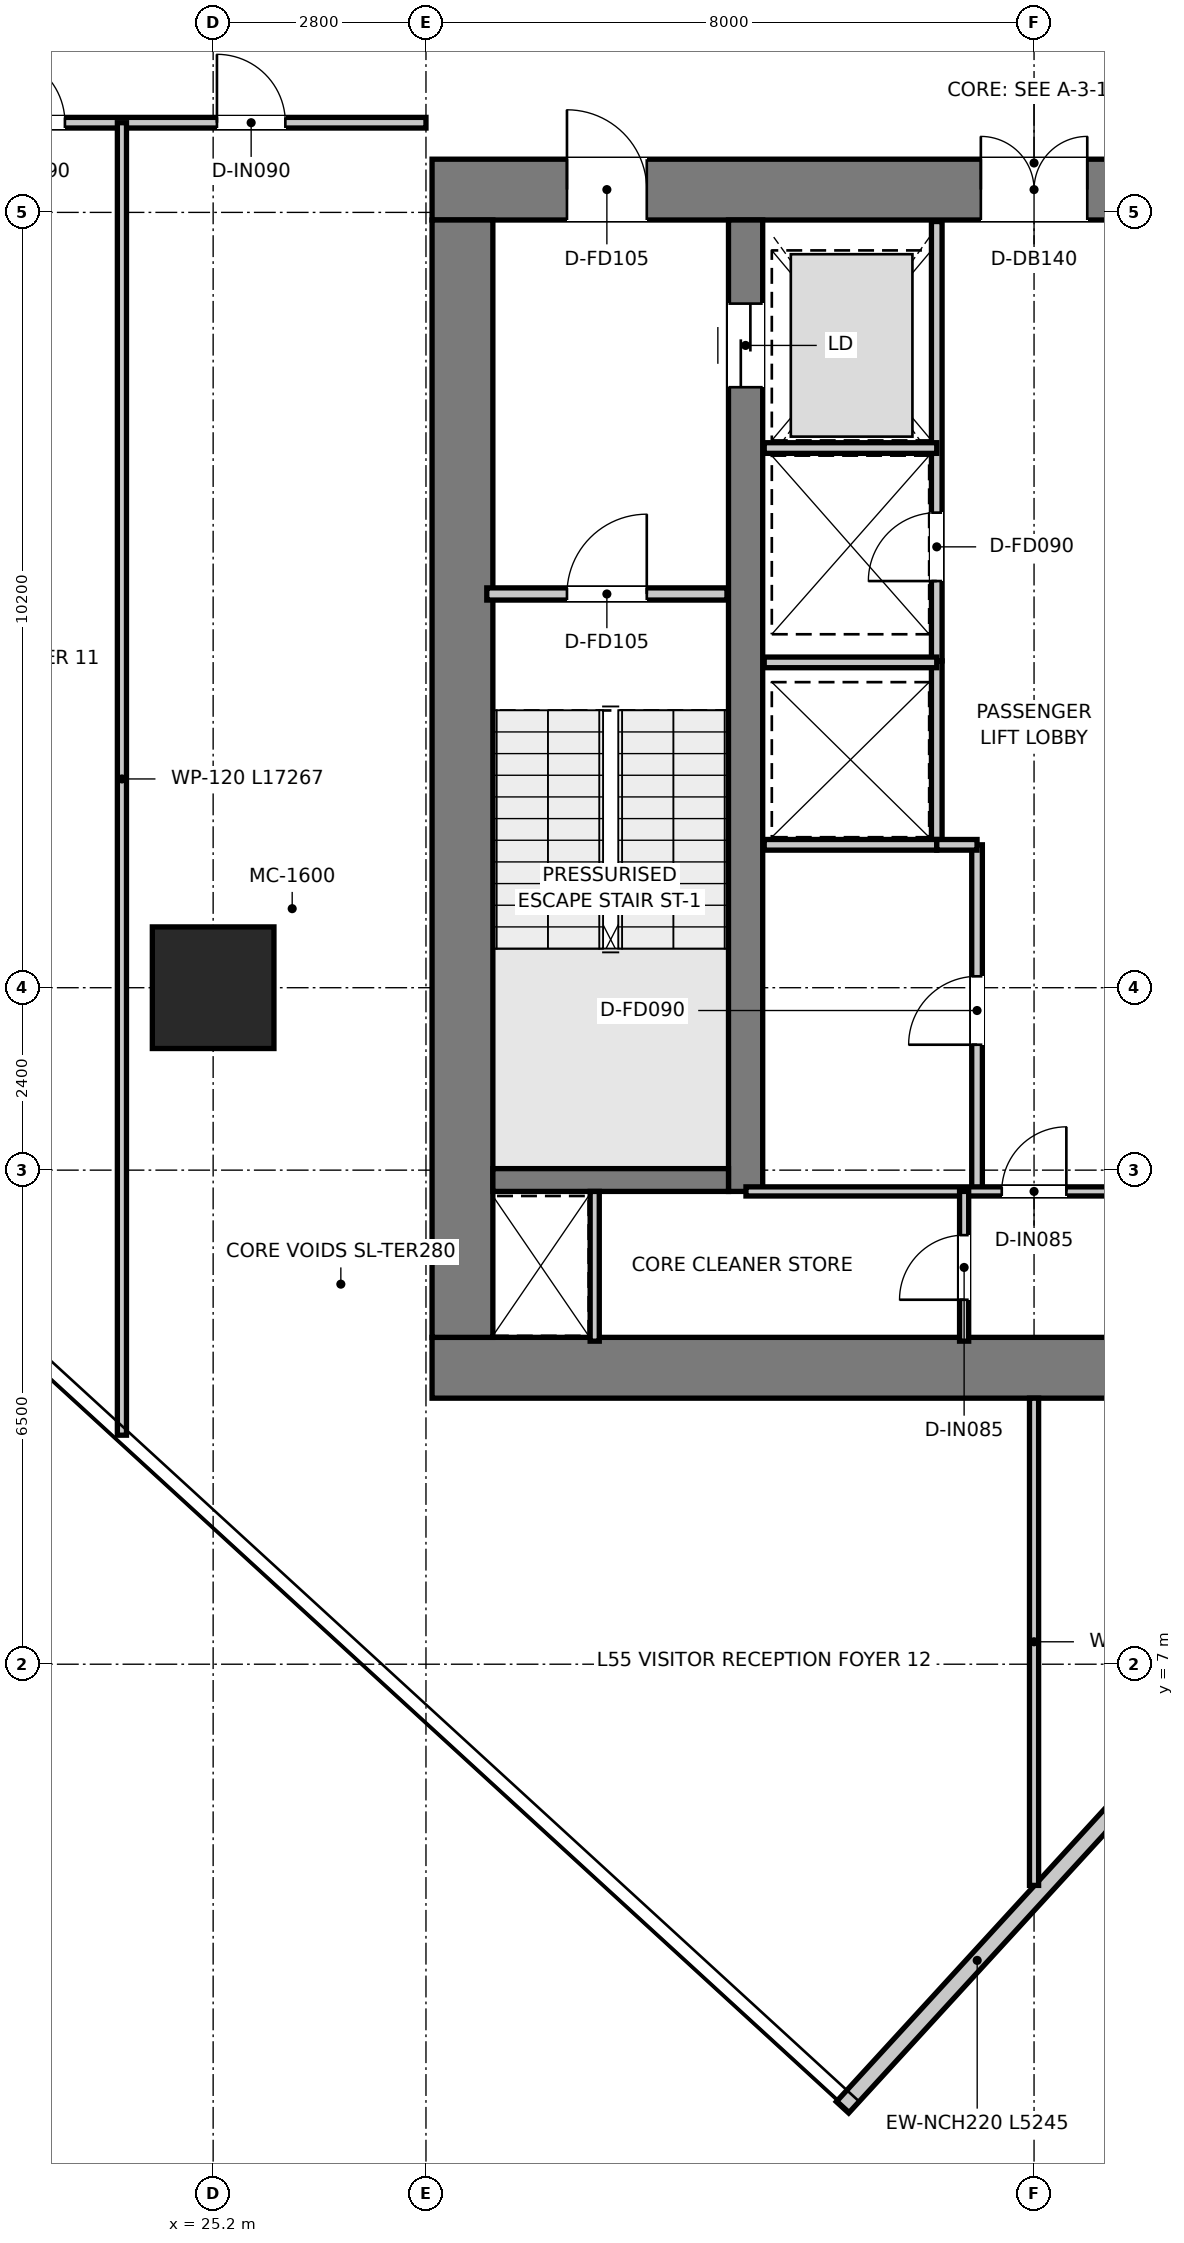
"""IFC4 building model, lengths in metres.
Left out: names, types, materials, properties, quantities, classifications, styles, units other than length and angle.
Written with IfcOpenShell. Run it as: python <this file> out.ifc"""

import sys

from ifc_helpers import new_model, si_unit, direction, frame, frame_2d, origin, origin_2d, place, context, subcontext, project, spatial, rectangle, extrude, source, transform, mapped, element, fill, save


model = new_model("IFC4")
c1 = context("Model", 3, precision=1e-05, world=origin(), true_north=direction((0.0, 1.0)))
c2 = subcontext(c1, "Body", "Model", "MODEL_VIEW")
j1 = project(units=[si_unit("LENGTHUNIT", "METRE"), si_unit("PLANEANGLEUNIT", "RADIAN")], contexts=[c1])
p1 = place(None, origin())
s1 = spatial("IfcSite", under=j1, at=p1, CompositionType="ELEMENT")
p2 = place(p1, origin())
s2 = spatial("IfcBuilding", under=s1, at=p2, CompositionType="ELEMENT")
p3 = place(p2, frame((0.0, 0.0, 227.05)))
s3 = spatial("IfcBuildingStorey", under=s2, at=p3, CompositionType="ELEMENT", Elevation=227.05)
p4 = place(p3, frame((28.08, 10.9, 0.0), z_axis=(0.0, 0.0, 1.0), x_axis=(1.0, 0.0, 0.0)))
e1 = element("IfcWall", 1, at=p4, inside=s3, PredefinedType="SHEAR", context=c2, shape_type="SweptSolid", body=[
    extrude(rectangle(XDim=15.84, YDim=0.8, at=frame_2d((7.92, 0.0))), origin(), (0.0, 0.0, 1.0), 3.95),
])
p5 = place(p3, frame((28.08, 26.4, 0.0), z_axis=(0.0, 0.0, 1.0), x_axis=(1.0, 0.0, 0.0)))
e2 = element("IfcWall", 2, at=p5, inside=s3, PredefinedType="SHEAR", context=c2, shape_type="SweptSolid", body=[
    extrude(rectangle(XDim=15.84, YDim=0.8, at=frame_2d((7.92, 0.0))), origin(), (0.0, 0.0, 1.0), 3.95),
])
p6 = place(p5, frame((7.22, 0.0, 0.0)))
e3 = element("IfcOpeningElement", 3, at=p6, cuts=e2, PredefinedType="OPENING", context=c2, shape_type="SweptSolid", body=[
    extrude(rectangle(XDim=1.4, YDim=2.2, at=frame_2d((0.7, 1.1))), frame((0.0, 0.41, 0.0), z_axis=(0.0, -1.0, 0.0), x_axis=(1.0, 0.0, 0.0)), (0.0, 0.0, 1.0), 0.82),
])
p7 = place(p5, frame((1.775, 0.0, 0.0)))
e4 = element("IfcOpeningElement", 4, at=p7, cuts=e2, PredefinedType="OPENING", context=c2, shape_type="SweptSolid", body=[
    extrude(rectangle(XDim=1.05, YDim=2.1, at=frame_2d((0.525, 1.05))), frame((0.0, 0.41, 0.0), z_axis=(0.0, -1.0, 0.0), x_axis=(1.0, 0.0, 0.0)), (0.0, 0.0, 1.0), 0.82),
])
p8 = place(p5, frame((13.015, 0.0, 0.0)))
e5 = element("IfcOpeningElement", 5, at=p8, cuts=e2, PredefinedType="OPENING", context=c2, shape_type="SweptSolid", body=[
    extrude(rectangle(XDim=1.05, YDim=2.1, at=frame_2d((0.525, 1.05))), frame((0.0, 0.41, 0.0), z_axis=(0.0, -1.0, 0.0), x_axis=(1.0, 0.0, 0.0)), (0.0, 0.0, 1.0), 0.82),
])
p9 = place(p3, frame((28.48, 11.3, 0.0), z_axis=(0.0, 0.0, 1.0), x_axis=(0.0, 1.0, 0.0)))
e6 = element("IfcWall", 6, at=p9, inside=s3, PredefinedType="SHEAR", context=c2, shape_type="SweptSolid", body=[
    extrude(rectangle(XDim=14.7, YDim=0.8, at=frame_2d((7.35, 0.0))), origin(), (0.0, 0.0, 1.0), 3.95),
])
p10 = place(p3, frame((32.205, 13.22, 0.0), z_axis=(0.0, 0.0, 1.0), x_axis=(0.0, 1.0, 0.0)))
e7 = element("IfcWall", 7, at=p10, inside=s3, PredefinedType="SHEAR", context=c2, shape_type="SweptSolid", body=[
    extrude(rectangle(XDim=12.78, YDim=0.45, at=frame_2d((6.39, 0.0))), origin(), (0.0, 0.0, 1.0), 3.95),
])
p11 = place(p10, frame((10.58, 0.0, 0.0)))
e8 = element("IfcOpeningElement", 8, at=p11, cuts=e7, PredefinedType="OPENING", context=c2, shape_type="SweptSolid", body=[
    extrude(rectangle(XDim=1.1, YDim=2.15, at=frame_2d((0.55, 1.075))), frame((0.0, 0.235, 0.0), z_axis=(0.0, -1.0, 0.0), x_axis=(1.0, 0.0, 0.0)), (0.0, 0.0, 1.0), 0.47),
])
p12 = place(p3, frame((28.88, 13.37, 0.0), z_axis=(0.0, 0.0, 1.0), x_axis=(1.0, 0.0, 0.0)))
e9 = element("IfcWall", 9, at=p12, inside=s3, PredefinedType="SHEAR", context=c2, shape_type="SweptSolid", body=[
    extrude(rectangle(XDim=3.1, YDim=0.3, at=frame_2d((1.55, 0.0))), origin(), (0.0, 0.0, 1.0), 3.95),
])
m1 = source(origin(), c2, "Body", "SweptSolid", [
    extrude(rectangle(XDim=1.6, YDim=1.6, at=origin_2d()), origin(), (0.0, 0.0, 1.0), 3.95),
])
p13 = place(p3, frame((25.2, 15.9, 0.0), z_axis=(0.0, 0.0, 1.0), x_axis=(1.0, 0.0, 0.0)))
e10 = element("IfcColumn", 10, at=p13, inside=s3, PredefinedType="USERDEFINED", context=c2, shape_type="MappedRepresentation", body=[
    mapped(m1, transform((0.0, 0.0, 0.0), x_axis=(1.0, 0.0, 0.0), y_axis=(0.0, 1.0, 0.0), z_axis=(0.0, 0.0, 1.0), scale=1.0)),
])
p14 = place(p3, frame((33.48, 1.17, 0.0), z_axis=(0.0, 0.0, 1.0), x_axis=(0.675596040677, 0.737271991752, 0.0)))
e11 = element("IfcWall", 11, at=p14, inside=s3, PredefinedType="ELEMENTEDWALL", context=c2, shape_type="SweptSolid", body=[
    extrude(rectangle(XDim=5.245, YDim=0.22, at=frame_2d((2.623, 0.0))), origin(), (0.0, 0.0, 1.0), 3.67),
])
p15 = place(p3, frame((28.8, 21.08, 0.0), z_axis=(0.0, 0.0, 1.0), x_axis=(1.0, 0.0, 0.0)))
e12 = element("IfcWall", 12, at=p15, inside=s3, PredefinedType="PARTITIONING", context=c2, shape_type="SweptSolid", body=[
    extrude(rectangle(XDim=3.16, YDim=0.16, at=frame_2d((1.58, 0.0))), origin(), (0.0, 0.0, 1.0), 3.67),
])
p16 = place(p15, frame((1.055, 0.0, 0.0)))
e13 = element("IfcOpeningElement", 13, at=p16, cuts=e12, PredefinedType="OPENING", context=c2, shape_type="SweptSolid", body=[
    extrude(rectangle(XDim=1.05, YDim=2.1, at=frame_2d((0.525, 1.05))), frame((0.0, 0.09, 0.0), z_axis=(0.0, -1.0, 0.0), x_axis=(1.0, 0.0, 0.0)), (0.0, 0.0, 1.0), 0.18),
])
p17 = place(p3, frame((34.72, 20.2, 0.0), z_axis=(0.0, 0.0, 1.0), x_axis=(0.0, 1.0, 0.0)))
e14 = element("IfcWall", 14, at=p17, inside=s3, PredefinedType="PARTITIONING", context=c2, shape_type="SweptSolid", body=[
    extrude(rectangle(XDim=5.78, YDim=0.14, at=frame_2d((2.89, 0.0))), origin(), (0.0, 0.0, 1.0), 2.67),
])
p18 = place(p17, frame((1.05, 0.0, 0.0)))
e15 = element("IfcOpeningElement", 15, at=p18, cuts=e14, PredefinedType="OPENING", context=c2, shape_type="SweptSolid", body=[
    extrude(rectangle(XDim=0.9, YDim=2.1, at=frame_2d((0.45, 1.05))), frame((0.0, 0.08, 0.0), z_axis=(0.0, -1.0, 0.0), x_axis=(1.0, 0.0, 0.0)), (0.0, 0.0, 1.0), 0.16),
])
p19 = place(p3, frame((32.45, 23.0, 0.0), z_axis=(0.0, 0.0, 1.0), x_axis=(1.0, 0.0, 0.0)))
e16 = element("IfcWall", 16, at=p19, inside=s3, PredefinedType="PARTITIONING", context=c2, shape_type="SweptSolid", body=[
    extrude(rectangle(XDim=2.27, YDim=0.14, at=frame_2d((1.135, 0.0))), origin(), (0.0, 0.0, 1.0), 2.67),
])
p20 = place(p3, frame((34.72, 17.78, 0.0), z_axis=(0.0, 0.0, 1.0), x_axis=(0.0, 1.0, 0.0)))
e17 = element("IfcWall", 17, at=p20, inside=s3, PredefinedType="PARTITIONING", context=c2, shape_type="SweptSolid", body=[
    extrude(rectangle(XDim=2.42, YDim=0.14, at=frame_2d((1.21, 0.0))), origin(), (0.0, 0.0, 1.0), 3.67),
])
for number, where, z_axis, x_axis in (
    (18, (32.45, 17.78, 0.0), (0.0, 0.0, 1.0), (1.0, 0.0, 0.0)),
    (19, (32.45, 20.18, 0.0), (0.0, 0.0, 1.0), (1.0, 0.0, 0.0)),
):
    element("IfcWall", number, at=place(p3, frame(where, z_axis=z_axis, x_axis=x_axis)), inside=s3, PredefinedType="PARTITIONING", context=c2, shape_type="SweptSolid", body=[
        extrude(rectangle(XDim=2.27, YDim=0.14, at=frame_2d((1.135, 0.0))), origin(), (0.0, 0.0, 1.0), 3.67),
    ])
p21 = place(p3, frame((35.25, 13.22, 0.0), z_axis=(0.0, 0.0, 1.0), x_axis=(0.0, 1.0, 0.0)))
e20 = element("IfcWall", 20, at=p21, inside=s3, PredefinedType="PARTITIONING", context=c2, shape_type="SweptSolid", body=[
    extrude(rectangle(XDim=4.56, YDim=0.14, at=frame_2d((2.28, 0.0))), origin(), (0.0, 0.0, 1.0), 3.67),
])
p22 = place(p21, frame((1.93, 0.0, 0.0)))
e21 = element("IfcOpeningElement", 21, at=p22, cuts=e20, PredefinedType="OPENING", context=c2, shape_type="SweptSolid", body=[
    extrude(rectangle(XDim=0.9, YDim=2.1, at=frame_2d((0.45, 1.05))), frame((0.0, 0.08, 0.0), z_axis=(0.0, -1.0, 0.0), x_axis=(1.0, 0.0, 0.0)), (0.0, 0.0, 1.0), 0.16),
])
p23 = place(p3, frame((34.72, 17.78, 0.0), z_axis=(0.0, 0.0, 1.0), x_axis=(1.0, 0.0, 0.0)))
e22 = element("IfcWall", 22, at=p23, inside=s3, PredefinedType="PARTITIONING", context=c2, shape_type="SweptSolid", body=[
    extrude(rectangle(XDim=0.53, YDim=0.14, at=frame_2d((0.265, 0.0))), origin(), (0.0, 0.0, 1.0), 3.67),
])
p24 = place(p3, frame((30.22, 11.25, 0.0), z_axis=(0.0, 0.0, 1.0), x_axis=(0.0, 1.0, 0.0)))
e23 = element("IfcWall", 23, at=p24, inside=s3, PredefinedType="PARTITIONING", context=c2, shape_type="SweptSolid", body=[
    extrude(rectangle(XDim=1.97, YDim=0.12, at=frame_2d((0.985, 0.0))), origin(), (0.0, 0.0, 1.0), 3.67),
])
p25 = place(p3, frame((32.21, 13.22, 0.0), z_axis=(0.0, 0.0, 1.0), x_axis=(1.0, 0.0, 0.0)))
e24 = element("IfcWall", 24, at=p25, inside=s3, PredefinedType="PARTITIONING", context=c2, shape_type="SweptSolid", body=[
    extrude(rectangle(XDim=7.58, YDim=0.12, at=frame_2d((3.79, 0.0))), origin(), (0.0, 0.0, 1.0), 3.67),
])
p26 = place(p25, frame((3.365, 0.0, 0.0)))
e25 = element("IfcOpeningElement", 25, at=p26, cuts=e24, PredefinedType="OPENING", context=c2, shape_type="SweptSolid", body=[
    extrude(rectangle(XDim=0.85, YDim=2.1, at=frame_2d((0.425, 1.05))), frame((0.0, 0.07, 0.0), z_axis=(0.0, -1.0, 0.0), x_axis=(1.0, 0.0, 0.0)), (0.0, 0.0, 1.0), 0.14),
])
p27 = place(p3, frame((35.08, 11.25, 0.0), z_axis=(0.0, 0.0, 1.0), x_axis=(0.0, 1.0, 0.0)))
e26 = element("IfcWall", 26, at=p27, inside=s3, PredefinedType="PARTITIONING", context=c2, shape_type="SweptSolid", body=[
    extrude(rectangle(XDim=1.97, YDim=0.12, at=frame_2d((0.985, 0.0))), origin(), (0.0, 0.0, 1.0), 3.67),
])
p28 = place(p27, frame((0.545, 0.0, 0.0)))
e27 = element("IfcOpeningElement", 27, at=p28, cuts=e26, PredefinedType="OPENING", context=c2, shape_type="SweptSolid", body=[
    extrude(rectangle(XDim=0.85, YDim=2.1, at=frame_2d((0.425, 1.05))), frame((0.0, 0.07, 0.0), z_axis=(0.0, -1.0, 0.0), x_axis=(1.0, 0.0, 0.0)), (0.0, 0.0, 1.0), 0.14),
])
p29 = place(p3, frame((12.757, 27.28, 0.0), z_axis=(0.0, 0.0, 1.0), x_axis=(1.0, 0.0, 0.0)))
e28 = element("IfcWall", 28, at=p29, inside=s3, PredefinedType="PARTITIONING", context=c2, shape_type="SweptSolid", body=[
    extrude(rectangle(XDim=15.243, YDim=0.14, at=frame_2d((7.622, 0.0))), origin(), (0.0, 0.0, 1.0), 3.03),
])
p30 = place(p29, frame((2.056, 0.0, 0.0)))
e29 = element("IfcOpeningElement", 29, at=p30, cuts=e28, PredefinedType="OPENING", context=c2, shape_type="SweptSolid", body=[
    extrude(rectangle(XDim=0.9, YDim=2.1, at=frame_2d((0.45, 1.05))), frame((0.0, 0.08, 0.0), z_axis=(0.0, -1.0, 0.0), x_axis=(1.0, 0.0, 0.0)), (0.0, 0.0, 1.0), 0.16),
])
p31 = place(p29, frame((9.593, 0.0, 0.0)))
e30 = element("IfcOpeningElement", 30, at=p31, cuts=e28, PredefinedType="OPENING", context=c2, shape_type="SweptSolid", body=[
    extrude(rectangle(XDim=0.9, YDim=2.1, at=frame_2d((0.45, 1.05))), frame((0.0, 0.08, 0.0), z_axis=(0.0, -1.0, 0.0), x_axis=(1.0, 0.0, 0.0)), (0.0, 0.0, 1.0), 0.16),
])
p32 = place(p29, frame((12.493, 0.0, 0.0)))
e31 = element("IfcOpeningElement", 31, at=p32, cuts=e28, PredefinedType="OPENING", context=c2, shape_type="SweptSolid", body=[
    extrude(rectangle(XDim=0.9, YDim=2.1, at=frame_2d((0.45, 1.05))), frame((0.0, 0.08, 0.0), z_axis=(0.0, -1.0, 0.0), x_axis=(1.0, 0.0, 0.0)), (0.0, 0.0, 1.0), 0.16),
])
p33 = place(p3, frame((36.0, 4.09, 0.0), z_axis=(0.0, 0.0, 1.0), x_axis=(0.0, 1.0, 0.0)))
e32 = element("IfcWall", 32, at=p33, inside=s3, PredefinedType="PARTITIONING", context=c2, shape_type="SweptSolid", body=[
    extrude(rectangle(XDim=6.41, YDim=0.12, at=frame_2d((3.205, 0.0))), origin(), (0.0, 0.0, 1.0), 3.67),
])
p34 = place(p3, frame((24.0, 10.013, 0.0), z_axis=(0.0, 0.0, 1.0), x_axis=(0.0, 1.0, 0.0)))
e33 = element("IfcWall", 33, at=p34, inside=s3, PredefinedType="PARTITIONING", context=c2, shape_type="SweptSolid", body=[
    extrude(rectangle(XDim=17.267, YDim=0.12, at=frame_2d((8.634, 0.0))), origin(), (0.0, 0.0, 1.0), 3.18),
])
p35 = place(p16, origin())
e34 = element("IfcDoor", 34, at=p35, inside=s3, OperationType="SINGLE_SWING_RIGHT", PredefinedType="DOOR", context=c2, shape_type="SweptSolid", body=[
    extrude(rectangle(XDim=1.05, YDim=2.1, at=frame_2d((0.525, 1.05))), frame((0.0, 0.025, 0.0), z_axis=(0.0, -1.0, 0.0), x_axis=(1.0, 0.0, 0.0)), (0.0, 0.0, 1.0), 0.05),
])
fill(e13, e34)
p36 = place(p6, origin())
e35 = element("IfcDoor", 35, at=p36, inside=s3, OperationType="DOUBLE_DOOR_SINGLE_SWING", PredefinedType="DOOR", context=c2, shape_type="SweptSolid", body=[
    extrude(rectangle(XDim=1.4, YDim=2.2, at=frame_2d((0.7, 1.1))), frame((0.0, 0.025, 0.0), z_axis=(0.0, -1.0, 0.0), x_axis=(1.0, 0.0, 0.0)), (0.0, 0.0, 1.0), 0.05),
])
fill(e3, e35)
p37 = place(p7, origin())
e36 = element("IfcDoor", 36, at=p37, inside=s3, OperationType="SINGLE_SWING_LEFT", PredefinedType="DOOR", context=c2, shape_type="SweptSolid", body=[
    extrude(rectangle(XDim=1.05, YDim=2.1, at=frame_2d((0.525, 1.05))), frame((0.0, 0.025, 0.0), z_axis=(0.0, -1.0, 0.0), x_axis=(1.0, 0.0, 0.0)), (0.0, 0.0, 1.0), 0.05),
])
fill(e4, e36)
p38 = place(p11, origin())
e37 = element("IfcDoor", 37, at=p38, inside=s3, OperationType="DOUBLE_DOOR_SLIDING", PredefinedType="DOOR", context=c2, shape_type="SweptSolid", body=[
    extrude(rectangle(XDim=1.1, YDim=2.15, at=frame_2d((0.55, 1.075))), frame((0.0, 0.025, 0.0), z_axis=(0.0, -1.0, 0.0), x_axis=(1.0, 0.0, 0.0)), (0.0, 0.0, 1.0), 0.05),
])
fill(e8, e37)
p39 = place(p18, origin())
e38 = element("IfcDoor", 38, at=p39, inside=s3, OperationType="SINGLE_SWING_LEFT", PredefinedType="DOOR", context=c2, shape_type="SweptSolid", body=[
    extrude(rectangle(XDim=0.9, YDim=2.1, at=frame_2d((0.45, 1.05))), frame((0.0, 0.025, 0.0), z_axis=(0.0, -1.0, 0.0), x_axis=(1.0, 0.0, 0.0)), (0.0, 0.0, 1.0), 0.05),
])
fill(e15, e38)
p40 = place(p22, origin())
e39 = element("IfcDoor", 39, at=p40, inside=s3, OperationType="SINGLE_SWING_LEFT", PredefinedType="DOOR", context=c2, shape_type="SweptSolid", body=[
    extrude(rectangle(XDim=0.9, YDim=2.1, at=frame_2d((0.45, 1.05))), frame((0.0, 0.025, 0.0), z_axis=(0.0, -1.0, 0.0), x_axis=(1.0, 0.0, 0.0)), (0.0, 0.0, 1.0), 0.05),
])
fill(e21, e39)
p41 = place(p26, origin())
e40 = element("IfcDoor", 40, at=p41, inside=s3, OperationType="SINGLE_SWING_RIGHT", PredefinedType="DOOR", context=c2, shape_type="SweptSolid", body=[
    extrude(rectangle(XDim=0.85, YDim=2.1, at=frame_2d((0.425, 1.05))), frame((0.0, 0.025, 0.0), z_axis=(0.0, -1.0, 0.0), x_axis=(1.0, 0.0, 0.0)), (0.0, 0.0, 1.0), 0.05),
])
fill(e25, e40)
p42 = place(p28, origin())
e41 = element("IfcDoor", 41, at=p42, inside=s3, OperationType="SINGLE_SWING_LEFT", PredefinedType="DOOR", context=c2, shape_type="SweptSolid", body=[
    extrude(rectangle(XDim=0.85, YDim=2.1, at=frame_2d((0.425, 1.05))), frame((0.0, 0.025, 0.0), z_axis=(0.0, -1.0, 0.0), x_axis=(1.0, 0.0, 0.0)), (0.0, 0.0, 1.0), 0.05),
])
fill(e27, e41)
p43 = place(p31, origin())
e42 = element("IfcDoor", 42, at=p43, inside=s3, OperationType="SINGLE_SWING_LEFT", PredefinedType="DOOR", context=c2, shape_type="SweptSolid", body=[
    extrude(rectangle(XDim=0.9, YDim=2.1, at=frame_2d((0.45, 1.05))), frame((0.0, 0.025, 0.0), z_axis=(0.0, -1.0, 0.0), x_axis=(1.0, 0.0, 0.0)), (0.0, 0.0, 1.0), 0.05),
])
fill(e30, e42)
p44 = place(p32, origin())
e43 = element("IfcDoor", 43, at=p44, inside=s3, OperationType="SINGLE_SWING_LEFT", PredefinedType="DOOR", context=c2, shape_type="SweptSolid", body=[
    extrude(rectangle(XDim=0.9, YDim=2.1, at=frame_2d((0.45, 1.05))), frame((0.0, 0.025, 0.0), z_axis=(0.0, -1.0, 0.0), x_axis=(1.0, 0.0, 0.0)), (0.0, 0.0, 1.0), 0.05),
])
fill(e31, e43)
save(model, sys.argv[1])
